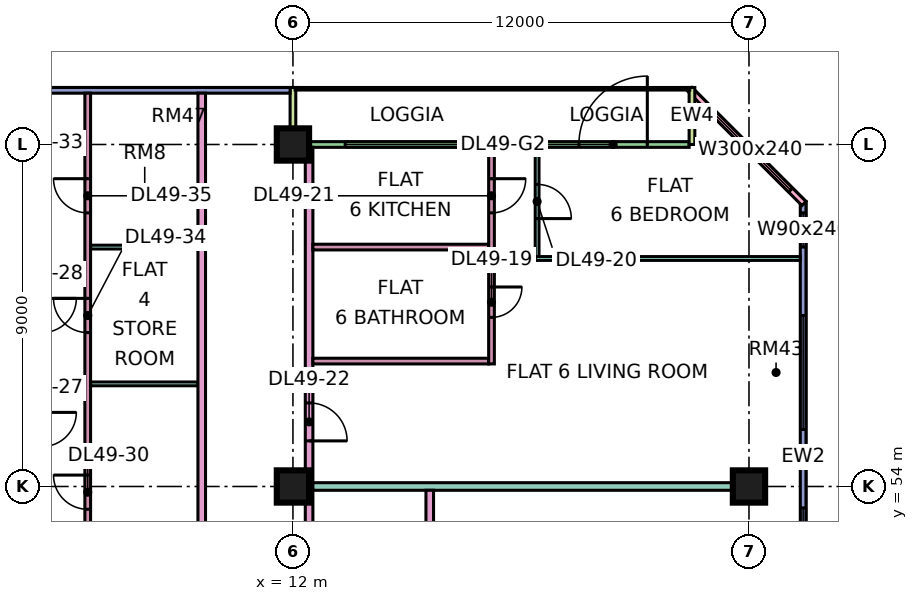
"""IFC4 building model, lengths in metres.
Left out: names, types, materials, properties, quantities, classifications, styles, units other than length and angle.
Written with IfcOpenShell. Run it as: python <this file> out.ifc"""

import sys

from ifc_helpers import new_model, si_unit, direction, frame, frame_2d, origin, origin_2d, place, context, subcontext, project, spatial, rectangle, extrude, element, fill, save


model = new_model("IFC4")
c1 = context("Model", 3, precision=1e-05, world=origin(), true_north=direction((0.0, 1.0)))
c2 = subcontext(c1, "Body", "Model", "MODEL_VIEW")
j1 = project(units=[si_unit("LENGTHUNIT", "METRE"), si_unit("PLANEANGLEUNIT", "RADIAN")], contexts=[c1])
p1 = place(None, origin())
s1 = spatial("IfcSite", under=j1, at=p1, CompositionType="ELEMENT")
p2 = place(p1, origin())
s2 = spatial("IfcBuilding", under=s1, at=p2, CompositionType="ELEMENT")
p3 = place(p2, frame((0.0, 0.0, 211.65)))
s3 = spatial("IfcBuildingStorey", under=s2, at=p3, CompositionType="ELEMENT", Elevation=211.65)
for number, where, z_axis, x_axis in (
    (1, (12.0, 54.0, 0.0), (0.0, 0.0, 1.0), (1.0, 0.0, 0.0)),
    (2, (12.0, 63.0, 0.0), (0.0, 0.0, 1.0), (1.0, 0.0, 0.0)),
    (3, (24.0, 54.0, 0.0), (0.0, 0.0, 1.0), (1.0, 0.0, 0.0)),
):
    element("IfcColumn", number, at=place(p3, frame(where, z_axis=z_axis, x_axis=x_axis)), inside=s3, PredefinedType="COLUMN", context=c2, shape_type="SweptSolid", body=[
        extrude(rectangle(XDim=0.85, YDim=0.85, at=origin_2d()), origin(), (0.0, 0.0, 1.0), 3.75),
    ])
p4 = place(p3, frame((25.425, 48.075, 0.0), z_axis=(0.0, 0.0, 1.0), x_axis=(0.0, 1.0, 0.0)))
e4 = element("IfcWall", 4, at=p4, inside=s3, PredefinedType="SOLIDWALL", context=c2, shape_type="SweptSolid", body=[
    extrude(rectangle(XDim=13.425, YDim=0.15, at=frame_2d((6.712, 0.0))), origin(), (0.0, 0.0, 1.0), 3.35),
])
p5 = place(p4, frame((0.562, 0.0, 0.45)))
e5 = element("IfcOpeningElement", 5, at=p5, cuts=e4, PredefinedType="OPENING", context=c2, shape_type="SweptSolid", body=[
    extrude(rectangle(XDim=4.8, YDim=2.4, at=frame_2d((2.4, 1.2))), frame((0.0, 0.085, 0.0), z_axis=(0.0, -1.0, 0.0), x_axis=(1.0, 0.0, 0.0)), (0.0, 0.0, 1.0), 0.17),
])
p6 = place(p4, frame((7.425, 0.0, 0.45)))
e6 = element("IfcOpeningElement", 6, at=p6, cuts=e4, PredefinedType="OPENING", context=c2, shape_type="SweptSolid", body=[
    extrude(rectangle(XDim=3.0, YDim=2.4, at=frame_2d((1.5, 1.2))), frame((0.0, 0.085, 0.0), z_axis=(0.0, -1.0, 0.0), x_axis=(1.0, 0.0, 0.0)), (0.0, 0.0, 1.0), 0.17),
])
p7 = place(p4, frame((12.225, 0.0, 0.45)))
e7 = element("IfcOpeningElement", 7, at=p7, cuts=e4, PredefinedType="OPENING", context=c2, shape_type="SweptSolid", body=[
    extrude(rectangle(XDim=0.9, YDim=2.4, at=frame_2d((0.45, 1.2))), frame((0.0, 0.085, 0.0), z_axis=(0.0, -1.0, 0.0), x_axis=(1.0, 0.0, 0.0)), (0.0, 0.0, 1.0), 0.17),
])
p8 = place(p3, frame((25.447, 61.447, 0.0), z_axis=(0.0, 0.0, 1.0), x_axis=(-0.707106781187, 0.707106781187, 0.0)))
e8 = element("IfcWall", 8, at=p8, inside=s3, PredefinedType="SOLIDWALL", context=c2, shape_type="SweptSolid", body=[
    extrude(rectangle(XDim=4.243, YDim=0.15, at=frame_2d((2.121, 0.0))), origin(), (0.0, 0.0, 1.0), 3.35),
])
p9 = place(p8, frame((0.498, 0.0, 0.45)))
e9 = element("IfcOpeningElement", 9, at=p9, cuts=e8, PredefinedType="OPENING", context=c2, shape_type="SweptSolid", body=[
    extrude(rectangle(XDim=3.0, YDim=2.4, at=frame_2d((1.5, 1.2))), frame((0.0, 0.085, 0.0), z_axis=(0.0, -1.0, 0.0), x_axis=(1.0, 0.0, 0.0)), (0.0, 0.0, 1.0), 0.17),
])
p10 = place(p3, frame((22.425, 63.0, 0.0), z_axis=(0.0, 0.0, 1.0), x_axis=(-1.0, 0.0, 0.0)))
e10 = element("IfcWall", 10, at=p10, inside=s3, PredefinedType="SOLIDWALL", context=c2, shape_type="SweptSolid", body=[
    extrude(rectangle(XDim=10.35, YDim=0.15, at=frame_2d((5.175, 0.0))), origin(), (0.0, 0.0, 1.0), 3.35),
])
p11 = place(p10, frame((1.1, 0.0, 0.0)))
e11 = element("IfcOpeningElement", 11, at=p11, cuts=e10, PredefinedType="OPENING", context=c2, shape_type="SweptSolid", body=[
    extrude(rectangle(XDim=1.8, YDim=2.4, at=frame_2d((0.9, 1.2))), frame((0.0, 0.085, 0.0), z_axis=(0.0, -1.0, 0.0), x_axis=(1.0, 0.0, 0.0)), (0.0, 0.0, 1.0), 0.17),
])
p12 = place(p10, frame((6.05, 0.0, 0.45)))
e12 = element("IfcOpeningElement", 12, at=p12, cuts=e10, PredefinedType="OPENING", context=c2, shape_type="SweptSolid", body=[
    extrude(rectangle(XDim=3.0, YDim=2.4, at=frame_2d((1.5, 1.2))), frame((0.0, 0.085, 0.0), z_axis=(0.0, -1.0, 0.0), x_axis=(1.0, 0.0, 0.0)), (0.0, 0.0, 1.0), 0.17),
])
for number, where, z_axis, x_axis in (
    (13, (22.5, 64.5, 0.0), (0.0, 0.0, 1.0), (0.0, -1.0, 0.0)),
    (14, (12.0, 64.5, 0.0), (0.0, 0.0, 1.0), (0.0, -1.0, 0.0)),
):
    element("IfcWall", number, at=place(p3, frame(where, z_axis=z_axis, x_axis=x_axis)), inside=s3, PredefinedType="SOLIDWALL", context=c2, shape_type="SweptSolid", body=[
        extrude(rectangle(XDim=1.5, YDim=0.15, at=frame_2d((0.75, 0.0))), origin(), (0.0, 0.0, 1.0), 3.35),
    ])
p13 = place(p3, frame((11.925, 64.425, 0.0), z_axis=(0.0, 0.0, 1.0), x_axis=(-1.0, 0.0, 0.0)))
e15 = element("IfcWall", 15, at=p13, inside=s3, PredefinedType="SOLIDWALL", context=c2, shape_type="SweptSolid", body=[
    extrude(rectangle(XDim=10.425, YDim=0.15, at=frame_2d((5.212, 0.0))), origin(), (0.0, 0.0, 1.0), 3.35),
])
p14 = place(p13, frame((6.375, 0.0, 0.45)))
e16 = element("IfcOpeningElement", 16, at=p14, cuts=e15, PredefinedType="OPENING", context=c2, shape_type="SweptSolid", body=[
    extrude(rectangle(XDim=3.6, YDim=2.4, at=frame_2d((1.8, 1.2))), frame((0.0, 0.085, 0.0), z_axis=(0.0, -1.0, 0.0), x_axis=(1.0, 0.0, 0.0)), (0.0, 0.0, 1.0), 0.17),
])
p15 = place(p3, frame((5.45, 63.0, 0.0), z_axis=(0.0, 0.0, 1.0), x_axis=(1.0, 0.0, 0.0)))
e17 = element("IfcWall", 17, at=p15, inside=s3, PredefinedType="PARTITIONING", context=c2, shape_type="SweptSolid", body=[
    extrude(rectangle(XDim=0.55, YDim=0.1, at=frame_2d((0.275, 0.0))), origin(), (0.0, 0.0, 1.0), 3.35),
])
p16 = place(p3, frame((6.6, 39.525, 0.0), z_axis=(0.0, 0.0, 1.0), x_axis=(0.0, 1.0, 0.0)))
e18 = element("IfcWall", 18, at=p16, inside=s3, PredefinedType="PARTITIONING", context=c2, shape_type="SweptSolid", body=[
    extrude(rectangle(XDim=24.825, YDim=0.15, at=frame_2d((12.413, 0.0))), origin(), (0.0, 0.0, 1.0), 3.35),
])
p17 = place(p16, frame((3.225, 0.0, 0.0)))
e19 = element("IfcOpeningElement", 19, at=p17, cuts=e18, PredefinedType="OPENING", context=c2, shape_type="SweptSolid", body=[
    extrude(rectangle(XDim=0.8, YDim=2.1, at=frame_2d((0.4, 1.05))), frame((0.0, 0.085, 0.0), z_axis=(0.0, -1.0, 0.0), x_axis=(1.0, 0.0, 0.0)), (0.0, 0.0, 1.0), 0.17),
])
p18 = place(p16, frame((13.875, 0.0, 0.0)))
e20 = element("IfcOpeningElement", 20, at=p18, cuts=e18, PredefinedType="OPENING", context=c2, shape_type="SweptSolid", body=[
    extrude(rectangle(XDim=0.9, YDim=2.1, at=frame_2d((0.45, 1.05))), frame((0.0, 0.085, 0.0), z_axis=(0.0, -1.0, 0.0), x_axis=(1.0, 0.0, 0.0)), (0.0, 0.0, 1.0), 0.17),
])
p19 = place(p16, frame((6.225, 0.0, 0.0)))
e21 = element("IfcOpeningElement", 21, at=p19, cuts=e18, PredefinedType="OPENING", context=c2, shape_type="SweptSolid", body=[
    extrude(rectangle(XDim=0.8, YDim=2.1, at=frame_2d((0.4, 1.05))), frame((0.0, 0.085, 0.0), z_axis=(0.0, -1.0, 0.0), x_axis=(1.0, 0.0, 0.0)), (0.0, 0.0, 1.0), 0.17),
])
p20 = place(p16, frame((18.525, 0.0, 0.0)))
e22 = element("IfcOpeningElement", 22, at=p20, cuts=e18, PredefinedType="OPENING", context=c2, shape_type="SweptSolid", body=[
    extrude(rectangle(XDim=0.9, YDim=2.1, at=frame_2d((0.45, 1.05))), frame((0.0, 0.085, 0.0), z_axis=(0.0, -1.0, 0.0), x_axis=(1.0, 0.0, 0.0)), (0.0, 0.0, 1.0), 0.17),
])
p21 = place(p16, frame((21.675, 0.0, 0.0)))
e23 = element("IfcOpeningElement", 23, at=p21, cuts=e18, PredefinedType="OPENING", context=c2, shape_type="SweptSolid", body=[
    extrude(rectangle(XDim=0.9, YDim=2.1, at=frame_2d((0.45, 1.05))), frame((0.0, 0.085, 0.0), z_axis=(0.0, -1.0, 0.0), x_axis=(1.0, 0.0, 0.0)), (0.0, 0.0, 1.0), 0.17),
])
p22 = place(p16, frame((9.375, 0.0, 0.0)))
e24 = element("IfcOpeningElement", 24, at=p22, cuts=e18, PredefinedType="OPENING", context=c2, shape_type="SweptSolid", body=[
    extrude(rectangle(XDim=0.8, YDim=2.1, at=frame_2d((0.4, 1.05))), frame((0.0, 0.085, 0.0), z_axis=(0.0, -1.0, 0.0), x_axis=(1.0, 0.0, 0.0)), (0.0, 0.0, 1.0), 0.17),
])
for number, where, z_axis, x_axis in (
    (25, (6.675, 56.7, 0.0), (0.0, 0.0, 1.0), (1.0, 0.0, 0.0)),
    (26, (6.675, 60.3, 0.0), (0.0, 0.0, 1.0), (1.0, 0.0, 0.0)),
):
    element("IfcWall", number, at=place(p3, frame(where, z_axis=z_axis, x_axis=x_axis)), inside=s3, PredefinedType="PARTITIONING", context=c2, shape_type="SweptSolid", body=[
        extrude(rectangle(XDim=2.825, YDim=0.1, at=frame_2d((1.413, 0.0))), origin(), (0.0, 0.0, 1.0), 3.35),
    ])
p23 = place(p3, frame((9.6, 20.0, 0.0), z_axis=(0.0, 0.0, 1.0), x_axis=(0.0, 1.0, 0.0)))
e27 = element("IfcWall", 27, at=p23, inside=s3, PredefinedType="PARTITIONING", context=c2, shape_type="SweptSolid", body=[
    extrude(rectangle(XDim=44.35, YDim=0.2, at=frame_2d((22.175, 0.0))), origin(), (0.0, 0.0, 1.0), 3.35),
])
p24 = place(p23, frame((17.25, 0.0, 0.0)))
e28 = element("IfcOpeningElement", 28, at=p24, cuts=e27, PredefinedType="OPENING", context=c2, shape_type="SweptSolid", body=[
    extrude(rectangle(XDim=1.0, YDim=2.1, at=frame_2d((0.5, 1.05))), frame((0.0, 0.11, 0.0), z_axis=(0.0, -1.0, 0.0), x_axis=(1.0, 0.0, 0.0)), (0.0, 0.0, 1.0), 0.22),
])
p25 = place(p23, frame((0.6, 0.0, 0.0)))
e29 = element("IfcOpeningElement", 29, at=p25, cuts=e27, PredefinedType="OPENING", context=c2, shape_type="SweptSolid", body=[
    extrude(rectangle(XDim=1.2, YDim=2.1, at=frame_2d((0.6, 1.05))), frame((0.0, 0.11, 0.0), z_axis=(0.0, -1.0, 0.0), x_axis=(1.0, 0.0, 0.0)), (0.0, 0.0, 1.0), 0.22),
])
p26 = place(p23, frame((4.35, 0.0, 0.0)))
e30 = element("IfcOpeningElement", 30, at=p26, cuts=e27, PredefinedType="OPENING", context=c2, shape_type="SweptSolid", body=[
    extrude(rectangle(XDim=1.0, YDim=2.1, at=frame_2d((0.5, 1.05))), frame((0.0, 0.11, 0.0), z_axis=(0.0, -1.0, 0.0), x_axis=(1.0, 0.0, 0.0)), (0.0, 0.0, 1.0), 0.22),
])
p27 = place(p3, frame((12.425, 20.0, 0.0), z_axis=(0.0, 0.0, 1.0), x_axis=(0.0, 1.0, 0.0)))
e31 = element("IfcWall", 31, at=p27, inside=s3, PredefinedType="PARTITIONING", context=c2, shape_type="SweptSolid", body=[
    extrude(rectangle(XDim=42.926, YDim=0.2, at=frame_2d((21.463, 0.0))), origin(), (0.0, 0.0, 1.0), 3.35),
])
p28 = place(p27, frame((7.0, 0.0, 0.0)))
e32 = element("IfcOpeningElement", 32, at=p28, cuts=e31, PredefinedType="OPENING", context=c2, shape_type="SweptSolid", body=[
    extrude(rectangle(XDim=1.0, YDim=2.1, at=frame_2d((0.5, 1.05))), frame((0.0, 0.11, 0.0), z_axis=(0.0, -1.0, 0.0), x_axis=(1.0, 0.0, 0.0)), (0.0, 0.0, 1.0), 0.22),
])
p29 = place(p27, frame((12.95, 0.0, 0.0)))
e33 = element("IfcOpeningElement", 33, at=p29, cuts=e31, PredefinedType="OPENING", context=c2, shape_type="SweptSolid", body=[
    extrude(rectangle(XDim=1.0, YDim=2.1, at=frame_2d((0.5, 1.05))), frame((0.0, 0.11, 0.0), z_axis=(0.0, -1.0, 0.0), x_axis=(1.0, 0.0, 0.0)), (0.0, 0.0, 1.0), 0.22),
])
p30 = place(p27, frame((23.35, 0.0, 0.0)))
e34 = element("IfcOpeningElement", 34, at=p30, cuts=e31, PredefinedType="OPENING", context=c2, shape_type="SweptSolid", body=[
    extrude(rectangle(XDim=1.0, YDim=2.1, at=frame_2d((0.5, 1.05))), frame((0.0, 0.11, 0.0), z_axis=(0.0, -1.0, 0.0), x_axis=(1.0, 0.0, 0.0)), (0.0, 0.0, 1.0), 0.22),
])
p31 = place(p27, frame((35.2, 0.0, 0.0)))
e35 = element("IfcOpeningElement", 35, at=p31, cuts=e31, PredefinedType="OPENING", context=c2, shape_type="SweptSolid", body=[
    extrude(rectangle(XDim=1.0, YDim=2.1, at=frame_2d((0.5, 1.05))), frame((0.0, 0.11, 0.0), z_axis=(0.0, -1.0, 0.0), x_axis=(1.0, 0.0, 0.0)), (0.0, 0.0, 1.0), 0.22),
])
p32 = place(p27, frame((1.15, 0.0, 0.0)))
e36 = element("IfcOpeningElement", 36, at=p32, cuts=e31, PredefinedType="OPENING", context=c2, shape_type="SweptSolid", body=[
    extrude(rectangle(XDim=1.8, YDim=2.1, at=frame_2d((0.9, 1.05))), frame((0.0, 0.11, 0.0), z_axis=(0.0, -1.0, 0.0), x_axis=(1.0, 0.0, 0.0)), (0.0, 0.0, 1.0), 0.22),
])
p33 = place(p27, frame((28.6, 0.0, 0.0)))
e37 = element("IfcOpeningElement", 37, at=p33, cuts=e31, PredefinedType="OPENING", context=c2, shape_type="SweptSolid", body=[
    extrude(rectangle(XDim=1.8, YDim=2.1, at=frame_2d((0.9, 1.05))), frame((0.0, 0.11, 0.0), z_axis=(0.0, -1.0, 0.0), x_axis=(1.0, 0.0, 0.0)), (0.0, 0.0, 1.0), 0.22),
])
p34 = place(p3, frame((12.525, 54.0, 0.0), z_axis=(0.0, 0.0, 1.0), x_axis=(1.0, 0.0, 0.0)))
e38 = element("IfcWall", 38, at=p34, inside=s3, PredefinedType="PARTITIONING", context=c2, shape_type="SweptSolid", body=[
    extrude(rectangle(XDim=11.475, YDim=0.2, at=frame_2d((5.738, 0.0))), origin(), (0.0, 0.0, 1.0), 3.35),
])
for number, where, z_axis, x_axis in (
    (39, (12.525, 57.3, 0.0), (0.0, 0.0, 1.0), (1.0, 0.0, 0.0)),
    (40, (12.525, 60.3, 0.0), (0.0, 0.0, 1.0), (1.0, 0.0, 0.0)),
):
    element("IfcWall", number, at=place(p3, frame(where, z_axis=z_axis, x_axis=x_axis)), inside=s3, PredefinedType="PARTITIONING", context=c2, shape_type="SweptSolid", body=[
        extrude(rectangle(XDim=4.625, YDim=0.15, at=frame_2d((2.312, 0.0))), origin(), (0.0, 0.0, 1.0), 3.35),
    ])
p35 = place(p3, frame((15.6, 51.225, 0.0), z_axis=(0.0, 0.0, 1.0), x_axis=(0.0, 1.0, 0.0)))
e41 = element("IfcWall", 41, at=p35, inside=s3, PredefinedType="PARTITIONING", context=c2, shape_type="SweptSolid", body=[
    extrude(rectangle(XDim=2.675, YDim=0.2, at=frame_2d((1.337, 0.0))), origin(), (0.0, 0.0, 1.0), 3.35),
])
p36 = place(p3, frame((17.225, 57.225, 0.0), z_axis=(0.0, 0.0, 1.0), x_axis=(0.0, 1.0, 0.0)))
e42 = element("IfcWall", 42, at=p36, inside=s3, PredefinedType="PARTITIONING", context=c2, shape_type="SweptSolid", body=[
    extrude(rectangle(XDim=5.701, YDim=0.15, at=frame_2d((2.851, 0.0))), origin(), (0.0, 0.0, 1.0), 3.35),
])
p37 = place(p36, frame((1.225, 0.0, 0.0)))
e43 = element("IfcOpeningElement", 43, at=p37, cuts=e42, PredefinedType="OPENING", context=c2, shape_type="SweptSolid", body=[
    extrude(rectangle(XDim=0.8, YDim=2.1, at=frame_2d((0.4, 1.05))), frame((0.0, 0.085, 0.0), z_axis=(0.0, -1.0, 0.0), x_axis=(1.0, 0.0, 0.0)), (0.0, 0.0, 1.0), 0.17),
])
p38 = place(p36, frame((3.975, 0.0, 0.0)))
e44 = element("IfcOpeningElement", 44, at=p38, cuts=e42, PredefinedType="OPENING", context=c2, shape_type="SweptSolid", body=[
    extrude(rectangle(XDim=0.9, YDim=2.1, at=frame_2d((0.45, 1.05))), frame((0.0, 0.085, 0.0), z_axis=(0.0, -1.0, 0.0), x_axis=(1.0, 0.0, 0.0)), (0.0, 0.0, 1.0), 0.17),
])
p39 = place(p3, frame((18.375, 60.0, 0.0), z_axis=(0.0, 0.0, 1.0), x_axis=(1.0, 0.0, 0.0)))
e45 = element("IfcWall", 45, at=p39, inside=s3, PredefinedType="PARTITIONING", context=c2, shape_type="SweptSolid", body=[
    extrude(rectangle(XDim=6.975, YDim=0.1, at=frame_2d((3.488, 0.0))), origin(), (0.0, 0.0, 1.0), 3.35),
])
p40 = place(p3, frame((18.425, 60.05, 0.0), z_axis=(0.0, 0.0, 1.0), x_axis=(0.0, 1.0, 0.0)))
e46 = element("IfcWall", 46, at=p40, inside=s3, PredefinedType="PARTITIONING", context=c2, shape_type="SweptSolid", body=[
    extrude(rectangle(XDim=2.876, YDim=0.1, at=frame_2d((1.438, 0.0))), origin(), (0.0, 0.0, 1.0), 3.35),
])
p41 = place(p40, frame((1.0, 0.0, 0.0)))
e47 = element("IfcOpeningElement", 47, at=p41, cuts=e46, PredefinedType="OPENING", context=c2, shape_type="SweptSolid", body=[
    extrude(rectangle(XDim=0.9, YDim=2.1, at=frame_2d((0.45, 1.05))), frame((0.0, 0.06, 0.0), z_axis=(0.0, -1.0, 0.0), x_axis=(1.0, 0.0, 0.0)), (0.0, 0.0, 1.0), 0.12),
])
p42 = place(p5, origin())
e48 = element("IfcWindow", 48, at=p42, inside=s3, PartitioningType="SINGLE_PANEL", PredefinedType="WINDOW", context=c2, shape_type="SweptSolid", body=[
    extrude(rectangle(XDim=4.8, YDim=2.4, at=frame_2d((2.4, 1.2))), frame((0.0, 0.03, 0.0), z_axis=(0.0, -1.0, 0.0), x_axis=(1.0, 0.0, 0.0)), (0.0, 0.0, 1.0), 0.06),
])
fill(e5, e48)
p43 = place(p6, origin())
e49 = element("IfcWindow", 49, at=p43, inside=s3, PartitioningType="SINGLE_PANEL", PredefinedType="WINDOW", context=c2, shape_type="SweptSolid", body=[
    extrude(rectangle(XDim=3.0, YDim=2.4, at=frame_2d((1.5, 1.2))), frame((0.0, 0.03, 0.0), z_axis=(0.0, -1.0, 0.0), x_axis=(1.0, 0.0, 0.0)), (0.0, 0.0, 1.0), 0.06),
])
fill(e6, e49)
p44 = place(p7, origin())
e50 = element("IfcWindow", 50, at=p44, inside=s3, PartitioningType="SINGLE_PANEL", PredefinedType="WINDOW", context=c2, shape_type="SweptSolid", body=[
    extrude(rectangle(XDim=0.9, YDim=2.4, at=frame_2d((0.45, 1.2))), frame((0.0, 0.03, 0.0), z_axis=(0.0, -1.0, 0.0), x_axis=(1.0, 0.0, 0.0)), (0.0, 0.0, 1.0), 0.06),
])
fill(e7, e50)
p45 = place(p9, origin())
e51 = element("IfcWindow", 51, at=p45, inside=s3, PartitioningType="SINGLE_PANEL", PredefinedType="WINDOW", context=c2, shape_type="SweptSolid", body=[
    extrude(rectangle(XDim=3.0, YDim=2.4, at=frame_2d((1.5, 1.2))), frame((0.0, 0.03, 0.0), z_axis=(0.0, -1.0, 0.0), x_axis=(1.0, 0.0, 0.0)), (0.0, 0.0, 1.0), 0.06),
])
fill(e9, e51)
p46 = place(p11, frame((1.8, 0.0, 0.0), z_axis=(0.0, 0.0, 1.0), x_axis=(-1.0, 0.0, 0.0)))
e52 = element("IfcDoor", 52, at=p46, inside=s3, OperationType="DOUBLE_DOOR_SINGLE_SWING", PredefinedType="DOOR", context=c2, shape_type="SweptSolid", body=[
    extrude(rectangle(XDim=1.8, YDim=2.4, at=frame_2d((0.9, 1.2))), frame((0.0, 0.025, 0.0), z_axis=(0.0, -1.0, 0.0), x_axis=(1.0, 0.0, 0.0)), (0.0, 0.0, 1.0), 0.05),
])
fill(e11, e52)
p47 = place(p12, origin())
e53 = element("IfcWindow", 53, at=p47, inside=s3, PartitioningType="SINGLE_PANEL", PredefinedType="WINDOW", context=c2, shape_type="SweptSolid", body=[
    extrude(rectangle(XDim=3.0, YDim=2.4, at=frame_2d((1.5, 1.2))), frame((0.0, 0.03, 0.0), z_axis=(0.0, -1.0, 0.0), x_axis=(1.0, 0.0, 0.0)), (0.0, 0.0, 1.0), 0.06),
])
fill(e12, e53)
p48 = place(p37, origin())
e54 = element("IfcDoor", 54, at=p48, inside=s3, OperationType="SINGLE_SWING_RIGHT", PredefinedType="DOOR", context=c2, shape_type="SweptSolid", body=[
    extrude(rectangle(XDim=0.8, YDim=2.1, at=frame_2d((0.4, 1.05))), frame((0.0, 0.025, 0.0), z_axis=(0.0, -1.0, 0.0), x_axis=(1.0, 0.0, 0.0)), (0.0, 0.0, 1.0), 0.05),
])
fill(e43, e54)
p49 = place(p41, frame((0.9, 0.0, 0.0), z_axis=(0.0, 0.0, 1.0), x_axis=(-1.0, 0.0, 0.0)))
e55 = element("IfcDoor", 55, at=p49, inside=s3, OperationType="SINGLE_SWING_LEFT", PredefinedType="DOOR", context=c2, shape_type="SweptSolid", body=[
    extrude(rectangle(XDim=0.9, YDim=2.1, at=frame_2d((0.45, 1.05))), frame((0.0, 0.025, 0.0), z_axis=(0.0, -1.0, 0.0), x_axis=(1.0, 0.0, 0.0)), (0.0, 0.0, 1.0), 0.05),
])
fill(e47, e55)
p50 = place(p38, origin())
e56 = element("IfcDoor", 56, at=p50, inside=s3, OperationType="SINGLE_SWING_RIGHT", PredefinedType="DOOR", context=c2, shape_type="SweptSolid", body=[
    extrude(rectangle(XDim=0.9, YDim=2.1, at=frame_2d((0.45, 1.05))), frame((0.0, 0.025, 0.0), z_axis=(0.0, -1.0, 0.0), x_axis=(1.0, 0.0, 0.0)), (0.0, 0.0, 1.0), 0.05),
])
fill(e44, e56)
p51 = place(p31, frame((1.0, 0.0, 0.0), z_axis=(0.0, 0.0, 1.0), x_axis=(-1.0, 0.0, 0.0)))
e57 = element("IfcDoor", 57, at=p51, inside=s3, OperationType="SINGLE_SWING_LEFT", PredefinedType="DOOR", context=c2, shape_type="SweptSolid", body=[
    extrude(rectangle(XDim=1.0, YDim=2.1, at=frame_2d((0.5, 1.05))), frame((0.0, 0.025, 0.0), z_axis=(0.0, -1.0, 0.0), x_axis=(1.0, 0.0, 0.0)), (0.0, 0.0, 1.0), 0.05),
])
fill(e35, e57)
p52 = place(p18, frame((0.9, 0.0, 0.0), z_axis=(0.0, 0.0, 1.0), x_axis=(-1.0, 0.0, 0.0)))
e58 = element("IfcDoor", 58, at=p52, inside=s3, OperationType="SINGLE_SWING_RIGHT", PredefinedType="DOOR", context=c2, shape_type="SweptSolid", body=[
    extrude(rectangle(XDim=0.9, YDim=2.1, at=frame_2d((0.45, 1.05))), frame((0.0, 0.025, 0.0), z_axis=(0.0, -1.0, 0.0), x_axis=(1.0, 0.0, 0.0)), (0.0, 0.0, 1.0), 0.05),
])
fill(e20, e58)
p53 = place(p20, frame((0.9, 0.0, 0.0), z_axis=(0.0, 0.0, 1.0), x_axis=(-1.0, 0.0, 0.0)))
e59 = element("IfcDoor", 59, at=p53, inside=s3, OperationType="SINGLE_SWING_RIGHT", PredefinedType="DOOR", context=c2, shape_type="SweptSolid", body=[
    extrude(rectangle(XDim=0.9, YDim=2.1, at=frame_2d((0.45, 1.05))), frame((0.0, 0.025, 0.0), z_axis=(0.0, -1.0, 0.0), x_axis=(1.0, 0.0, 0.0)), (0.0, 0.0, 1.0), 0.05),
])
fill(e22, e59)
p54 = place(p21, frame((0.9, 0.0, 0.0), z_axis=(0.0, 0.0, 1.0), x_axis=(-1.0, 0.0, 0.0)))
e60 = element("IfcDoor", 60, at=p54, inside=s3, OperationType="SINGLE_SWING_RIGHT", PredefinedType="DOOR", context=c2, shape_type="SweptSolid", body=[
    extrude(rectangle(XDim=0.9, YDim=2.1, at=frame_2d((0.45, 1.05))), frame((0.0, 0.025, 0.0), z_axis=(0.0, -1.0, 0.0), x_axis=(1.0, 0.0, 0.0)), (0.0, 0.0, 1.0), 0.05),
])
fill(e23, e60)
save(model, sys.argv[1])
